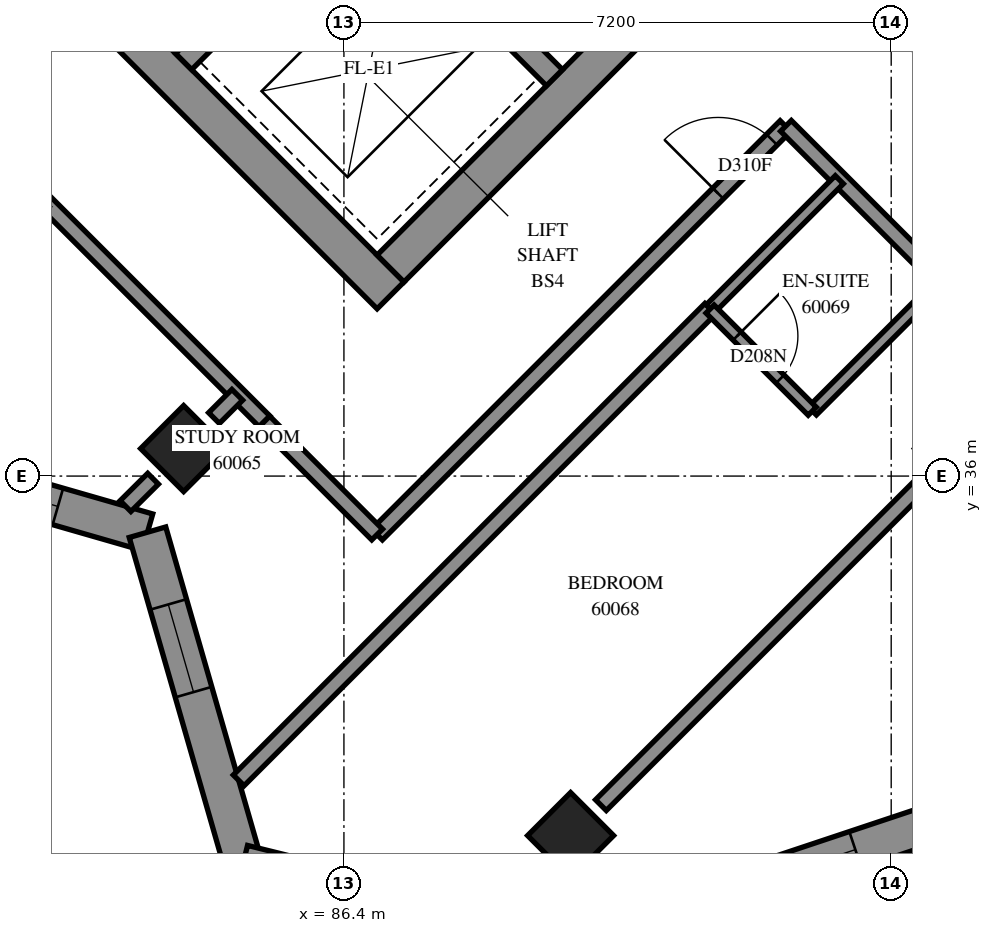
"""IFC4 building model, lengths in metres.
Left out: names, types, materials, properties, quantities, classifications, styles, units other than length and angle.
Written with IfcOpenShell. Run it as: python <this file> out.ifc"""

import sys

from ifc_helpers import new_model, si_unit, direction, frame, frame_2d, origin, origin_2d, place, context, subcontext, project, spatial, polyline, rectangle, outline, extrude, element, fill, save


model = new_model("IFC4")
c1 = context("Model", 3, precision=1e-05, world=origin(), true_north=direction((0.0, 1.0)))
c2 = subcontext(c1, "Body", "Model", "MODEL_VIEW")
j1 = project(units=[si_unit("LENGTHUNIT", "METRE"), si_unit("PLANEANGLEUNIT", "RADIAN")], contexts=[c1])
p1 = place(None, origin())
s1 = spatial("IfcSite", under=j1, at=p1, CompositionType="ELEMENT")
p2 = place(p1, origin())
s2 = spatial("IfcBuilding", under=s1, at=p2, CompositionType="ELEMENT")
p3 = place(p2, frame((0.0, 0.0, 220.2)))
s3 = spatial("IfcBuildingStorey", under=s2, at=p3, CompositionType="ELEMENT", Elevation=220.2)
for number, where, z_axis, x_axis in (
    (1, (84.291, 36.362, 0.0), (0.0, 0.0, 1.0), (0.707, -0.707, 0.0)),
    (2, (89.382, 31.271, 0.0), (0.0, 0.0, 1.0), (0.707, -0.707, 0.0)),
):
    element("IfcColumn", number, at=place(p3, frame(where, z_axis=z_axis, x_axis=x_axis)), inside=s3, PredefinedType="COLUMN", context=c2, shape_type="SweptSolid", body=[
        extrude(rectangle(XDim=0.8, YDim=0.8, at=origin_2d()), origin(), (0.0, 0.0, 1.0), 3.1),
    ])
p4 = place(p3, frame((76.124, 49.267, -0.3), z_axis=(0.0, 0.0, 1.0), x_axis=(0.7071067812, -0.7071067812, 0.0)))
e3 = element("IfcWall", 3, at=p4, inside=s3, PredefinedType="SHEAR", context=c2, shape_type="SweptSolid", body=[
    extrude(rectangle(XDim=15.4, YDim=0.5, at=frame_2d((7.7, 0.0))), origin(), (0.0, 0.0, 1.0), 2.7),
])
p5 = place(p3, frame((87.013, 38.731, -0.3), z_axis=(0.0, 0.0, 1.0), x_axis=(0.7071067812, 0.7071067812, 0.0)))
e4 = element("IfcWall", 4, at=p5, inside=s3, PredefinedType="SHEAR", context=c2, shape_type="SweptSolid", body=[
    extrude(rectangle(XDim=14.4, YDim=0.5, at=frame_2d((7.2, 0.0))), origin(), (0.0, 0.0, 1.0), 2.7),
])
p6 = place(p5, frame((4.55, 0.0, 0.3)))
e5 = element("IfcOpeningElement", 5, at=p6, cuts=e4, PredefinedType="OPENING", context=c2, shape_type="SweptSolid", body=[
    extrude(rectangle(XDim=1.1, YDim=2.1, at=frame_2d((0.55, 1.05))), frame((0.0, 0.26, 0.0), z_axis=(0.0, -1.0, 0.0), x_axis=(1.0, 0.0, 0.0)), (0.0, 0.0, 1.0), 0.52),
])
p7 = place(p5, frame((11.35, 0.0, 0.3)))
e6 = element("IfcOpeningElement", 6, at=p7, cuts=e4, PredefinedType="OPENING", context=c2, shape_type="SweptSolid", body=[
    extrude(rectangle(XDim=1.1, YDim=2.1, at=frame_2d((0.55, 1.05))), frame((0.0, 0.26, 0.0), z_axis=(0.0, -1.0, 0.0), x_axis=(1.0, 0.0, 0.0)), (0.0, 0.0, 1.0), 0.52),
])
p8 = place(p3, frame((84.291, 41.453, 0.0), z_axis=(0.0, 0.0, 1.0), x_axis=(0.7071067812, 0.7071067812, 0.0)))
e7 = element("IfcWall", 7, at=p8, inside=s3, PredefinedType="SOLIDWALL", context=c2, shape_type="SweptSolid", body=[
    extrude(rectangle(XDim=3.3, YDim=0.3, at=frame_2d((1.65, 0.0))), origin(), (0.0, 0.0, 1.0), 3.1),
])
p9 = place(p3, frame((78.988, 51.423, 0.0), z_axis=(0.0, 0.0, 1.0), x_axis=(0.7071067812, -0.7071067812, 0.0)))
e8 = element("IfcWall", 8, at=p9, inside=s3, PredefinedType="SOLIDWALL", context=c2, shape_type="SweptSolid", body=[
    extrude(rectangle(XDim=14.4, YDim=0.3, at=frame_2d((7.2, 0.0))), origin(), (0.0, 0.0, 1.0), 3.1),
])
p10 = place(p9, frame((1.35, 0.0, 0.0)))
e9 = element("IfcOpeningElement", 9, at=p10, cuts=e8, PredefinedType="OPENING", context=c2, shape_type="SweptSolid", body=[
    extrude(rectangle(XDim=0.9, YDim=2.1, at=frame_2d((0.45, 1.05))), frame((0.0, 0.16, 0.0), z_axis=(0.0, -1.0, 0.0), x_axis=(1.0, 0.0, 0.0)), (0.0, 0.0, 1.0), 0.32),
])
p11 = place(p9, frame((4.95, 0.0, 0.0)))
e10 = element("IfcOpeningElement", 10, at=p11, cuts=e8, PredefinedType="OPENING", context=c2, shape_type="SweptSolid", body=[
    extrude(rectangle(XDim=0.9, YDim=2.1, at=frame_2d((0.45, 1.05))), frame((0.0, 0.16, 0.0), z_axis=(0.0, -1.0, 0.0), x_axis=(1.0, 0.0, 0.0)), (0.0, 0.0, 1.0), 0.32),
])
p12 = place(p9, frame((8.55, 0.0, 0.0)))
e11 = element("IfcOpeningElement", 11, at=p12, cuts=e8, PredefinedType="OPENING", context=c2, shape_type="SweptSolid", body=[
    extrude(rectangle(XDim=0.9, YDim=2.1, at=frame_2d((0.45, 1.05))), frame((0.0, 0.16, 0.0), z_axis=(0.0, -1.0, 0.0), x_axis=(1.0, 0.0, 0.0)), (0.0, 0.0, 1.0), 0.32),
])
p13 = place(p9, frame((12.05, 0.0, 0.0)))
e12 = element("IfcOpeningElement", 12, at=p13, cuts=e8, PredefinedType="OPENING", context=c2, shape_type="SweptSolid", body=[
    extrude(rectangle(XDim=1.1, YDim=2.1, at=frame_2d((0.55, 1.05))), frame((0.0, 0.16, 0.0), z_axis=(0.0, -1.0, 0.0), x_axis=(1.0, 0.0, 0.0)), (0.0, 0.0, 1.0), 0.32),
])
p14 = place(p3, frame((89.372, 29.834, 0.0), z_axis=(0.0, 0.0, 1.0), x_axis=(0.9486871632, 0.3162161702, 0.0)))
e13 = element("IfcWall", 13, at=p14, inside=s3, PredefinedType="SOLIDWALL", context=c2, shape_type="SweptSolid", body=[
    extrude(outline(polyline([(-0.072, -0.25), (5.294, -0.25), (5.055, 0.25), (0.072, 0.25), (-0.072, -0.25)])), origin(), (0.0, 0.0, 1.0), 3.1),
])
p15 = place(p14, frame((1.159, 0.0, 0.45)))
e14 = element("IfcOpeningElement", 14, at=p15, cuts=e13, PredefinedType="OPENING", context=c2, shape_type="SweptSolid", body=[
    extrude(rectangle(XDim=1.3, YDim=2.5, at=frame_2d((0.65, 1.25))), frame((0.0, 0.26, 0.0), z_axis=(0.0, -1.0, 0.0), x_axis=(1.0, 0.0, 0.0)), (0.0, 0.0, 1.0), 0.52),
])
p16 = place(p14, frame((2.659, 0.0, 0.45)))
e15 = element("IfcOpeningElement", 15, at=p16, cuts=e13, PredefinedType="OPENING", context=c2, shape_type="SweptSolid", body=[
    extrude(rectangle(XDim=1.3, YDim=2.5, at=frame_2d((0.65, 1.25))), frame((0.0, 0.26, 0.0), z_axis=(0.0, -1.0, 0.0), x_axis=(1.0, 0.0, 0.0)), (0.0, 0.0, 1.0), 0.52),
])
p17 = place(p3, frame((79.452, 36.518, 0.0), z_axis=(0.0, 0.0, 1.0), x_axis=(0.960966817, -0.2766636526, 0.0)))
e16 = element("IfcWall", 16, at=p17, inside=s3, PredefinedType="SOLIDWALL", context=c2, shape_type="SweptSolid", body=[
    extrude(outline(polyline([(-0.144, -0.25), (4.402, -0.25), (4.679, 0.25), (0.144, 0.25), (-0.144, -0.25)])), origin(), (0.0, 0.0, 1.0), 3.1),
])
p18 = place(p17, frame((0.514, 0.0, 0.45)))
e17 = element("IfcOpeningElement", 17, at=p18, cuts=e16, PredefinedType="OPENING", context=c2, shape_type="SweptSolid", body=[
    extrude(rectangle(XDim=1.3, YDim=2.5, at=frame_2d((0.65, 1.25))), frame((0.0, 0.26, 0.0), z_axis=(0.0, -1.0, 0.0), x_axis=(1.0, 0.0, 0.0)), (0.0, 0.0, 1.0), 0.52),
])
p19 = place(p17, frame((2.014, 0.0, 0.45)))
e18 = element("IfcOpeningElement", 18, at=p19, cuts=e16, PredefinedType="OPENING", context=c2, shape_type="SweptSolid", body=[
    extrude(rectangle(XDim=1.3, YDim=2.5, at=frame_2d((0.65, 1.25))), frame((0.0, 0.26, 0.0), z_axis=(0.0, -1.0, 0.0), x_axis=(1.0, 0.0, 0.0)), (0.0, 0.0, 1.0), 0.52),
])
p20 = place(p3, frame((83.816, 35.261, 0.0), z_axis=(0.0, 0.0, 1.0), x_axis=(0.2766636526, -0.960966817, 0.0)))
e19 = element("IfcWall", 19, at=p20, inside=s3, PredefinedType="SOLIDWALL", context=c2, shape_type="SweptSolid", body=[
    extrude(outline(polyline([(0.138, -0.25), (4.685, -0.25), (4.396, 0.25), (-0.138, 0.25), (0.138, -0.25)])), origin(), (0.0, 0.0, 1.0), 3.1),
])
p21 = place(p20, frame((0.989, 0.0, 0.45)))
e20 = element("IfcOpeningElement", 20, at=p21, cuts=e19, PredefinedType="OPENING", context=c2, shape_type="SweptSolid", body=[
    extrude(rectangle(XDim=1.2, YDim=2.5, at=frame_2d((0.6, 1.25))), frame((0.0, 0.26, 0.0), z_axis=(0.0, -1.0, 0.0), x_axis=(1.0, 0.0, 0.0)), (0.0, 0.0, 1.0), 0.52),
])
p22 = place(p3, frame((85.072, 30.898, 0.0), z_axis=(0.0, 0.0, 1.0), x_axis=(0.9707042236, -0.2402775693, 0.0)))
e21 = element("IfcWall", 21, at=p22, inside=s3, PredefinedType="SOLIDWALL", context=c2, shape_type="SweptSolid", body=[
    extrude(outline(polyline([(-0.144, -0.25), (4.502, -0.25), (4.357, 0.25), (0.144, 0.25), (-0.144, -0.25)])), origin(), (0.0, 0.0, 1.0), 3.1),
])
p23 = place(p22, frame((2.063, 0.0, 0.45)))
e22 = element("IfcOpeningElement", 22, at=p23, cuts=e21, PredefinedType="OPENING", context=c2, shape_type="SweptSolid", body=[
    extrude(rectangle(XDim=1.2, YDim=2.5, at=frame_2d((0.6, 1.25))), frame((0.0, 0.26, 0.0), z_axis=(0.0, -1.0, 0.0), x_axis=(1.0, 0.0, 0.0)), (0.0, 0.0, 1.0), 0.52),
])
p24 = place(p3, frame((85.016, 31.997, 0.0), z_axis=(0.0, 0.0, 1.0), x_axis=(0.7071067812, 0.7071067812, 0.0)))
e23 = element("IfcWall", 23, at=p24, inside=s3, PredefinedType="PARTITIONING", context=c2, shape_type="SweptSolid", body=[
    extrude(rectangle(XDim=8.773, YDim=0.2, at=frame_2d((4.387, 0.0))), origin(), (0.0, 0.0, 1.0), 3.1),
])
p25 = place(p3, frame((86.835, 35.231, 0.0), z_axis=(0.0, 0.0, 1.0), x_axis=(0.7071067812, 0.7071067812, 0.0)))
e24 = element("IfcWall", 24, at=p25, inside=s3, PredefinedType="PARTITIONING", context=c2, shape_type="SweptSolid", body=[
    extrude(rectangle(XDim=7.6, YDim=0.2, at=frame_2d((3.8, 0.0))), origin(), (0.0, 0.0, 1.0), 3.1),
])
p26 = place(p25, frame((6.346, 0.0, 0.0)))
e25 = element("IfcOpeningElement", 25, at=p26, cuts=e24, PredefinedType="OPENING", context=c2, shape_type="SweptSolid", body=[
    extrude(rectangle(XDim=1.0, YDim=2.1, at=frame_2d((0.5, 1.05))), frame((0.0, 0.11, 0.0), z_axis=(0.0, -1.0, 0.0), x_axis=(1.0, 0.0, 0.0)), (0.0, 0.0, 1.0), 0.22),
])
p27 = place(p3, frame((80.522, 41.553, 0.0), z_axis=(0.0, 0.0, 1.0), x_axis=(0.7071067812, -0.7071067812, 0.0)))
e26 = element("IfcWall", 26, at=p27, inside=s3, PredefinedType="PARTITIONING", context=c2, shape_type="SweptSolid", body=[
    extrude(rectangle(XDim=6.836, YDim=0.2, at=frame_2d((3.418, 0.0))), origin(), (0.0, 0.0, 1.0), 3.1),
])
p28 = place(p3, frame((89.781, 31.671, 0.0), z_axis=(0.0, 0.0, 1.0), x_axis=(0.7071067812, 0.7071067812, 0.0)))
e27 = element("IfcWall", 27, at=p28, inside=s3, PredefinedType="PARTITIONING", context=c2, shape_type="SweptSolid", body=[
    extrude(rectangle(XDim=6.07, YDim=0.2, at=frame_2d((3.035, 0.0))), origin(), (0.0, 0.0, 1.0), 2.6),
])
p29 = place(p3, frame((93.623, 42.015, 0.0), z_axis=(0.0, 0.0, 1.0), x_axis=(0.7071067812, -0.7071067812, 0.0)))
e28 = element("IfcWall", 28, at=p29, inside=s3, PredefinedType="PARTITIONING", context=c2, shape_type="SweptSolid", body=[
    extrude(rectangle(XDim=4.599, YDim=0.2, at=frame_2d((2.3, 0.0))), origin(), (0.0, 0.0, 1.0), 3.1),
])
p30 = place(p29, frame((1.349, 0.0, 0.0)))
e29 = element("IfcOpeningElement", 29, at=p30, cuts=e28, PredefinedType="OPENING", context=c2, shape_type="SweptSolid", body=[
    extrude(rectangle(XDim=0.9, YDim=2.1, at=frame_2d((0.45, 1.05))), frame((0.0, 0.11, 0.0), z_axis=(0.0, -1.0, 0.0), x_axis=(1.0, 0.0, 0.0)), (0.0, 0.0, 1.0), 0.22),
])
p31 = place(p3, frame((92.216, 40.608, 0.0), z_axis=(0.0, 0.0, 1.0), x_axis=(0.7071067812, -0.7071067812, 0.0)))
e30 = element("IfcWall", 30, at=p31, inside=s3, PredefinedType="PARTITIONING", context=c2, shape_type="SweptSolid", body=[
    extrude(rectangle(XDim=4.599, YDim=0.2, at=frame_2d((2.3, 0.0))), origin(), (0.0, 0.0, 1.0), 3.1),
])
p32 = place(p31, frame((3.189, 0.0, 0.0)))
e31 = element("IfcOpeningElement", 31, at=p32, cuts=e30, PredefinedType="OPENING", context=c2, shape_type="SweptSolid", body=[
    extrude(rectangle(XDim=0.9, YDim=2.1, at=frame_2d((0.45, 1.05))), frame((0.0, 0.11, 0.0), z_axis=(0.0, -1.0, 0.0), x_axis=(1.0, 0.0, 0.0)), (0.0, 0.0, 1.0), 0.22),
])
for number, where, z_axis, x_axis in (
    (32, (92.563, 36.857, 0.0), (0.0, 0.0, 1.0), (0.707, 0.707, 0.0)),
    (33, (91.219, 38.201, 0.0), (0.0, 0.0, 1.0), (0.707, 0.707, 0.0)),
):
    element("IfcWall", number, at=place(p3, frame(where, z_axis=z_axis, x_axis=x_axis)), inside=s3, PredefinedType="PARTITIONING", context=c2, shape_type="SweptSolid", body=[
        extrude(rectangle(XDim=2.401, YDim=0.15, at=frame_2d((1.201, 0.0))), origin(), (0.0, 0.0, 1.0), 3.1),
    ])
p33 = place(p3, frame((85.353, 36.717, 0.0), z_axis=(0.0, 0.0, 1.0), x_axis=(0.7066304548, -0.7075827869, 0.0)))
e34 = element("IfcWall", 34, at=p33, inside=s3, PredefinedType="PARTITIONING", context=c2, shape_type="SweptSolid", body=[
    extrude(rectangle(XDim=2.1, YDim=0.2, at=frame_2d((1.05, 0.0))), origin(), (0.0, 0.0, 1.0), 3.1),
])
p34 = place(p3, frame((91.217, 38.197, 0.0), z_axis=(0.0, 0.0, 1.0), x_axis=(0.7071067812, -0.7071067812, 0.0)))
e35 = element("IfcWall", 35, at=p34, inside=s3, PredefinedType="PARTITIONING", context=c2, shape_type="SweptSolid", body=[
    extrude(rectangle(XDim=1.901, YDim=0.15, at=frame_2d((0.95, 0.0))), origin(), (0.0, 0.0, 1.0), 3.1),
])
p35 = place(p34, frame((0.502, 0.0, 0.0)))
e36 = element("IfcOpeningElement", 36, at=p35, cuts=e35, PredefinedType="OPENING", context=c2, shape_type="SweptSolid", body=[
    extrude(rectangle(XDim=0.8, YDim=2.1, at=frame_2d((0.4, 1.05))), frame((0.0, 0.085, 0.0), z_axis=(0.0, -1.0, 0.0), x_axis=(1.0, 0.0, 0.0)), (0.0, 0.0, 1.0), 0.17),
])
p36 = place(p3, frame((83.526, 35.605, 0.0), z_axis=(0.0, 0.0, 1.0), x_axis=(0.709548595, 0.7046565059, 0.0)))
e37 = element("IfcWall", 37, at=p36, inside=s3, PredefinedType="PARTITIONING", context=c2, shape_type="SweptSolid", body=[
    extrude(rectangle(XDim=0.511, YDim=0.2, at=frame_2d((0.256, 0.0))), origin(), (0.0, 0.0, 1.0), 3.1),
])
p37 = place(p3, frame((84.691, 36.763, 0.0), z_axis=(0.0, 0.0, 1.0), x_axis=(0.7071067812, 0.7071067812, 0.0)))
e38 = element("IfcWall", 38, at=p37, inside=s3, PredefinedType="PARTITIONING", context=c2, shape_type="SweptSolid", body=[
    extrude(rectangle(XDim=0.433, YDim=0.2, at=frame_2d((0.216, 0.0))), origin(), (0.0, 0.0, 1.0), 3.1),
])
p38 = place(p16, origin())
e39 = element("IfcWindow", 39, at=p38, inside=s3, PartitioningType="SINGLE_PANEL", PredefinedType="WINDOW", context=c2, shape_type="SweptSolid", body=[
    extrude(rectangle(XDim=1.3, YDim=2.5, at=frame_2d((0.65, 1.25))), frame((0.0, 0.18, 0.0), z_axis=(0.0, -1.0, 0.0), x_axis=(1.0, 0.0, 0.0)), (0.0, 0.0, 1.0), 0.06),
])
fill(e15, e39)
p39 = place(p19, origin())
e40 = element("IfcWindow", 40, at=p39, inside=s3, PartitioningType="SINGLE_PANEL", PredefinedType="WINDOW", context=c2, shape_type="SweptSolid", body=[
    extrude(rectangle(XDim=1.3, YDim=2.5, at=frame_2d((0.65, 1.25))), frame((0.0, 0.18, 0.0), z_axis=(0.0, -1.0, 0.0), x_axis=(1.0, 0.0, 0.0)), (0.0, 0.0, 1.0), 0.06),
])
fill(e18, e40)
p40 = place(p21, origin())
e41 = element("IfcWindow", 41, at=p40, inside=s3, PartitioningType="SINGLE_PANEL", PredefinedType="WINDOW", context=c2, shape_type="SweptSolid", body=[
    extrude(rectangle(XDim=1.2, YDim=2.5, at=frame_2d((0.6, 1.25))), frame((0.0, 0.18, 0.0), z_axis=(0.0, -1.0, 0.0), x_axis=(1.0, 0.0, 0.0)), (0.0, 0.0, 1.0), 0.06),
])
fill(e20, e41)
p41 = place(p26, origin())
e42 = element("IfcDoor", 42, at=p41, inside=s3, OperationType="SINGLE_SWING_RIGHT", PredefinedType="DOOR", context=c2, shape_type="SweptSolid", body=[
    extrude(rectangle(XDim=1.0, YDim=2.1, at=frame_2d((0.5, 1.05))), frame((0.0, 0.025, 0.0), z_axis=(0.0, -1.0, 0.0), x_axis=(1.0, 0.0, 0.0)), (0.0, 0.0, 1.0), 0.05),
])
fill(e25, e42)
p42 = place(p35, origin())
e43 = element("IfcDoor", 43, at=p42, inside=s3, OperationType="SINGLE_SWING_RIGHT", PredefinedType="DOOR", context=c2, shape_type="SweptSolid", body=[
    extrude(rectangle(XDim=0.8, YDim=2.1, at=frame_2d((0.4, 1.05))), frame((0.0, 0.025, 0.0), z_axis=(0.0, -1.0, 0.0), x_axis=(1.0, 0.0, 0.0)), (0.0, 0.0, 1.0), 0.05),
])
fill(e36, e43)
save(model, sys.argv[1])
